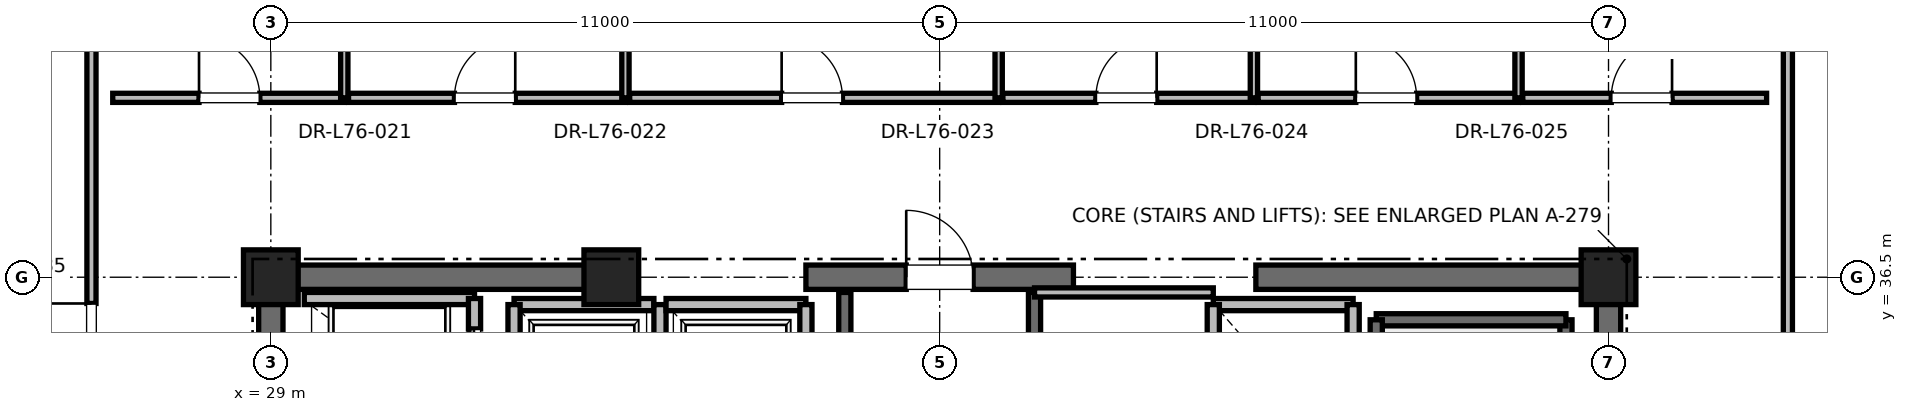
"""IFC4 building model, lengths in metres.
Left out: names, types, materials, properties, quantities, classifications, styles, units other than length and angle.
Written with IfcOpenShell. Run it as: python <this file> out.ifc"""

import sys

from ifc_helpers import new_model, si_unit, direction, frame, frame_2d, origin, origin_2d, place, context, subcontext, project, spatial, rectangle, extrude, element, fill, save


model = new_model("IFC4")
c1 = context("Model", 3, precision=1e-05, world=origin(), true_north=direction((0.0, 1.0)))
c2 = subcontext(c1, "Body", "Model", "MODEL_VIEW")
j1 = project(units=[si_unit("LENGTHUNIT", "METRE"), si_unit("PLANEANGLEUNIT", "RADIAN")], contexts=[c1])
p1 = place(None, origin())
s1 = spatial("IfcSite", under=j1, at=p1, CompositionType="ELEMENT")
p2 = place(p1, origin())
s2 = spatial("IfcBuilding", under=s1, at=p2, CompositionType="ELEMENT")
p3 = place(p2, frame((0.0, 0.0, 326.8)))
s3 = spatial("IfcBuildingStorey", under=s2, at=p3, CompositionType="ELEMENT", Elevation=326.8)
for number, where, z_axis, x_axis in (
    (1, (29.0, 36.5, 0.0), (0.0, 0.0, 1.0), (1.0, 0.0, 0.0)),
    (2, (51.0, 36.5, 0.0), (0.0, 0.0, 1.0), (1.0, 0.0, 0.0)),
    (3, (34.6, 36.5, 0.0), (0.0, 0.0, 1.0), (1.0, 0.0, 0.0)),
):
    element("IfcColumn", number, at=place(p3, frame(where, z_axis=z_axis, x_axis=x_axis)), inside=s3, PredefinedType="PILASTER", context=c2, shape_type="SweptSolid", body=[
        extrude(rectangle(XDim=0.9, YDim=0.9, at=origin_2d()), origin(), (0.0, 0.0, 1.0), 4.0),
    ])
p4 = place(p3, frame((29.0, 36.5, 0.0), z_axis=(0.0, 0.0, 1.0), x_axis=(1.0, 0.0, 0.0)))
e4 = element("IfcWall", 4, at=p4, inside=s3, PredefinedType="SHEAR", context=c2, shape_type="SweptSolid", body=[
    extrude(rectangle(XDim=5.8, YDim=0.4, at=frame_2d((2.9, 0.0))), origin(), (0.0, 0.0, 1.0), 3.785),
])
p5 = place(p3, frame((37.8, 36.5, 0.0), z_axis=(0.0, 0.0, 1.0), x_axis=(1.0, 0.0, 0.0)))
e5 = element("IfcWall", 5, at=p5, inside=s3, PredefinedType="SHEAR", context=c2, shape_type="SweptSolid", body=[
    extrude(rectangle(XDim=4.4, YDim=0.4, at=frame_2d((2.2, 0.0))), origin(), (0.0, 0.0, 1.0), 3.785),
])
p6 = place(p5, frame((1.65, 0.0, 0.0)))
e6 = element("IfcOpeningElement", 6, at=p6, cuts=e5, PredefinedType="OPENING", context=c2, shape_type="SweptSolid", body=[
    extrude(rectangle(XDim=1.1, YDim=2.15, at=frame_2d((0.55, 1.075))), frame((0.0, 0.2, 0.0), z_axis=(0.0, -1.0, 0.0), x_axis=(1.0, 0.0, 0.0)), (0.0, 0.0, 1.0), 0.4),
])
for number, where, z_axis, x_axis in (
    (7, (45.2, 36.5, 0.0), (0.0, 0.0, 1.0), (1.0, 0.0, 0.0)),
    (8, (29.0, 30.7, 0.0), (0.0, 0.0, 1.0), (0.0, 1.0, 0.0)),
):
    element("IfcWall", number, at=place(p3, frame(where, z_axis=z_axis, x_axis=x_axis)), inside=s3, PredefinedType="SHEAR", context=c2, shape_type="SweptSolid", body=[
        extrude(rectangle(XDim=5.8, YDim=0.4, at=frame_2d((2.9, 0.0))), origin(), (0.0, 0.0, 1.0), 3.785),
    ])
p7 = place(p3, frame((51.0, 27.7, 0.0), z_axis=(0.0, 0.0, 1.0), x_axis=(0.0, 1.0, 0.0)))
e9 = element("IfcWall", 9, at=p7, inside=s3, PredefinedType="SHEAR", context=c2, shape_type="SweptSolid", body=[
    extrude(rectangle(XDim=8.8, YDim=0.4, at=frame_2d((4.4, 0.0))), origin(), (0.0, 0.0, 1.0), 3.785),
])
p8 = place(p3, frame((50.3, 27.65, 0.0), z_axis=(0.0, 0.0, 1.0), x_axis=(0.0, 1.0, 0.0)))
e10 = element("IfcWall", 10, at=p8, inside=s3, PredefinedType="SOLIDWALL", context=c2, shape_type="SweptSolid", body=[
    extrude(rectangle(XDim=8.15, YDim=0.2, at=frame_2d((4.075, 0.0))), origin(), (0.0, 0.0, 1.0), 3.785),
])
p9 = place(p3, frame((47.18, 35.8, 0.0), z_axis=(0.0, 0.0, 1.0), x_axis=(1.0, 0.0, 0.0)))
e11 = element("IfcWall", 11, at=p9, inside=s3, PredefinedType="SOLIDWALL", context=c2, shape_type="SweptSolid", body=[
    extrude(rectangle(XDim=3.12, YDim=0.2, at=frame_2d((1.56, 0.0))), origin(), (0.0, 0.0, 1.0), 3.785),
])
p10 = place(p3, frame((47.18, 27.62, 0.0), z_axis=(0.0, 0.0, 1.0), x_axis=(0.0, 1.0, 0.0)))
e12 = element("IfcWall", 12, at=p10, inside=s3, PredefinedType="SOLIDWALL", context=c2, shape_type="SweptSolid", body=[
    extrude(rectangle(XDim=8.18, YDim=0.2, at=frame_2d((4.09, 0.0))), origin(), (0.0, 0.0, 1.0), 3.785),
])
p11 = place(p3, frame((38.44, 27.38, 0.0), z_axis=(0.0, 0.0, 1.0), x_axis=(0.0, 1.0, 0.0)))
e13 = element("IfcWall", 13, at=p11, inside=s3, PredefinedType="SOLIDWALL", context=c2, shape_type="SweptSolid", body=[
    extrude(rectangle(XDim=8.87, YDim=0.2, at=frame_2d((4.435, 0.0))), origin(), (0.0, 0.0, 1.0), 3.785),
])
p12 = place(p3, frame((41.56, 27.68, 0.0), z_axis=(0.0, 0.0, 1.0), x_axis=(0.0, 1.0, 0.0)))
e14 = element("IfcWall", 14, at=p12, inside=s3, PredefinedType="SOLIDWALL", context=c2, shape_type="SweptSolid", body=[
    extrude(rectangle(XDim=8.57, YDim=0.2, at=frame_2d((4.285, 0.0))), origin(), (0.0, 0.0, 1.0), 3.785),
])
p13 = place(p3, frame((32.35, 36.15, 0.0), z_axis=(0.0, 0.0, 1.0), x_axis=(-1.0, 0.0, 0.0)))
e15 = element("IfcWall", 15, at=p13, inside=s3, PredefinedType="SOLIDWALL", context=c2, shape_type="SweptSolid", body=[
    extrude(rectangle(XDim=2.8, YDim=0.2, at=frame_2d((1.4, 0.0))), origin(), (0.0, 0.0, 1.0), 3.22),
])
p14 = place(p3, frame((32.35, 34.05, 0.0), z_axis=(0.0, 0.0, 1.0), x_axis=(0.0, 1.0, 0.0)))
e16 = element("IfcWall", 16, at=p14, inside=s3, PredefinedType="SOLIDWALL", context=c2, shape_type="SweptSolid", body=[
    extrude(rectangle(XDim=2.1, YDim=0.2, at=frame_2d((1.05, 0.0))), origin(), (0.0, 0.0, 1.0), 3.785),
])
p15 = place(p14, frame((0.5, 0.0, 0.0)))
e17 = element("IfcOpeningElement", 17, at=p15, cuts=e16, PredefinedType="OPENING", context=c2, shape_type="SweptSolid", body=[
    extrude(rectangle(XDim=1.1, YDim=2.2, at=frame_2d((0.55, 1.1))), frame((0.0, 0.1, 0.0), z_axis=(0.0, -1.0, 0.0), x_axis=(1.0, 0.0, 0.0)), (0.0, 0.0, 1.0), 0.2),
])
p16 = place(p3, frame((35.3, 36.05, 0.0), z_axis=(0.0, 0.0, 1.0), x_axis=(-1.0, 0.0, 0.0)))
e18 = element("IfcWall", 18, at=p16, inside=s3, PredefinedType="SOLIDWALL", context=c2, shape_type="SweptSolid", body=[
    extrude(rectangle(XDim=2.3, YDim=0.2, at=frame_2d((1.15, 0.0))), origin(), (0.0, 0.0, 1.0), 2.865),
])
p17 = place(p3, frame((33.0, 36.05, 0.0), z_axis=(0.0, 0.0, 1.0), x_axis=(0.0, -1.0, 0.0)))
e19 = element("IfcWall", 19, at=p17, inside=s3, PredefinedType="SOLIDWALL", context=c2, shape_type="SweptSolid", body=[
    extrude(rectangle(XDim=2.6, YDim=0.2, at=frame_2d((1.3, 0.0))), origin(), (0.0, 0.0, 1.0), 3.785),
])
p18 = place(p3, frame((35.4, 33.45, 0.0), z_axis=(0.0, 0.0, 1.0), x_axis=(0.0, 1.0, 0.0)))
e20 = element("IfcWall", 20, at=p18, inside=s3, PredefinedType="SOLIDWALL", context=c2, shape_type="SweptSolid", body=[
    extrude(rectangle(XDim=2.6, YDim=0.2, at=frame_2d((1.3, 0.0))), origin(), (0.0, 0.0, 1.0), 2.865),
])
p19 = place(p3, frame((37.8, 36.05, 0.0), z_axis=(0.0, 0.0, 1.0), x_axis=(-1.0, 0.0, 0.0)))
e21 = element("IfcWall", 21, at=p19, inside=s3, PredefinedType="SOLIDWALL", context=c2, shape_type="SweptSolid", body=[
    extrude(rectangle(XDim=2.3, YDim=0.2, at=frame_2d((1.15, 0.0))), origin(), (0.0, 0.0, 1.0), 2.865),
])
p20 = place(p3, frame((37.8, 33.45, 0.0), z_axis=(0.0, 0.0, 1.0), x_axis=(0.0, 1.0, 0.0)))
e22 = element("IfcWall", 22, at=p20, inside=s3, PredefinedType="SOLIDWALL", context=c2, shape_type="SweptSolid", body=[
    extrude(rectangle(XDim=2.6, YDim=0.2, at=frame_2d((1.3, 0.0))), origin(), (0.0, 0.0, 1.0), 2.865),
])
p21 = place(p3, frame((46.8, 36.05, 0.0), z_axis=(0.0, 0.0, 1.0), x_axis=(-1.0, 0.0, 0.0)))
e23 = element("IfcWall", 23, at=p21, inside=s3, PredefinedType="SOLIDWALL", context=c2, shape_type="SweptSolid", body=[
    extrude(rectangle(XDim=2.3, YDim=0.2, at=frame_2d((1.15, 0.0))), origin(), (0.0, 0.0, 1.0), 2.865),
])
p22 = place(p3, frame((44.5, 36.05, 0.0), z_axis=(0.0, 0.0, 1.0), x_axis=(0.0, -1.0, 0.0)))
e24 = element("IfcWall", 24, at=p22, inside=s3, PredefinedType="SOLIDWALL", context=c2, shape_type="SweptSolid", body=[
    extrude(rectangle(XDim=2.6, YDim=0.2, at=frame_2d((1.3, 0.0))), origin(), (0.0, 0.0, 1.0), 2.865),
])
p23 = place(p3, frame((46.8, 33.45, 0.0), z_axis=(0.0, 0.0, 1.0), x_axis=(0.0, 1.0, 0.0)))
e25 = element("IfcWall", 25, at=p23, inside=s3, PredefinedType="SOLIDWALL", context=c2, shape_type="SweptSolid", body=[
    extrude(rectangle(XDim=2.6, YDim=0.2, at=frame_2d((1.3, 0.0))), origin(), (0.0, 0.0, 1.0), 3.785),
])
p24 = place(p3, frame((41.56, 36.25, 0.0), z_axis=(0.0, 0.0, 1.0), x_axis=(1.0, 0.0, 0.0)))
e26 = element("IfcWall", 26, at=p24, inside=s3, PredefinedType="PARTITIONING", context=c2, shape_type="SweptSolid", body=[
    extrude(rectangle(XDim=2.94, YDim=0.15, at=frame_2d((1.47, 0.0))), origin(), (0.0, 0.0, 1.0), 2.85),
])
p25 = place(p3, frame((26.4, 39.45, 0.0), z_axis=(0.0, 0.0, 1.0), x_axis=(1.0, 0.0, 0.0)))
e27 = element("IfcWall", 27, at=p25, inside=s3, PredefinedType="PARTITIONING", context=c2, shape_type="SweptSolid", body=[
    extrude(rectangle(XDim=3.808, YDim=0.15, at=frame_2d((1.904, 0.0))), origin(), (0.0, 0.0, 1.0), 2.85),
])
p26 = place(p25, frame((1.419, 0.0, 0.0)))
e28 = element("IfcOpeningElement", 28, at=p26, cuts=e27, PredefinedType="OPENING", context=c2, shape_type="SweptSolid", body=[
    extrude(rectangle(XDim=1.0, YDim=2.15, at=frame_2d((0.5, 1.075))), frame((0.0, 0.075, 0.0), z_axis=(0.0, -1.0, 0.0), x_axis=(1.0, 0.0, 0.0)), (0.0, 0.0, 1.0), 0.15),
])
p27 = place(p3, frame((30.208, 39.45, 0.0), z_axis=(0.0, 0.0, 1.0), x_axis=(0.0, 1.0, 0.0)))
e29 = element("IfcWall", 29, at=p27, inside=s3, PredefinedType="PARTITIONING", context=c2, shape_type="SweptSolid", body=[
    extrude(rectangle(XDim=9.566, YDim=0.12, at=frame_2d((4.783, 0.0))), origin(), (0.0, 0.0, 1.0), 2.415),
])
p28 = place(p3, frame((30.278, 39.45, 0.0), z_axis=(0.0, 0.0, 1.0), x_axis=(1.0, 0.0, 0.0)))
e30 = element("IfcWall", 30, at=p28, inside=s3, PredefinedType="PARTITIONING", context=c2, shape_type="SweptSolid", body=[
    extrude(rectangle(XDim=4.554, YDim=0.15, at=frame_2d((2.277, 0.0))), origin(), (0.0, 0.0, 1.0), 2.85),
])
p29 = place(p28, frame((1.742, 0.0, 0.0)))
e31 = element("IfcOpeningElement", 31, at=p29, cuts=e30, PredefinedType="OPENING", context=c2, shape_type="SweptSolid", body=[
    extrude(rectangle(XDim=1.0, YDim=2.15, at=frame_2d((0.5, 1.075))), frame((0.0, 0.075, 0.0), z_axis=(0.0, -1.0, 0.0), x_axis=(1.0, 0.0, 0.0)), (0.0, 0.0, 1.0), 0.15),
])
p30 = place(p3, frame((34.832, 39.45, 0.0), z_axis=(0.0, 0.0, 1.0), x_axis=(0.0, 1.0, 0.0)))
e32 = element("IfcWall", 32, at=p30, inside=s3, PredefinedType="PARTITIONING", context=c2, shape_type="SweptSolid", body=[
    extrude(rectangle(XDim=9.566, YDim=0.12, at=frame_2d((4.783, 0.0))), origin(), (0.0, 0.0, 1.0), 2.415),
])
p31 = place(p3, frame((34.902, 39.45, 0.0), z_axis=(0.0, 0.0, 1.0), x_axis=(1.0, 0.0, 0.0)))
e33 = element("IfcWall", 33, at=p31, inside=s3, PredefinedType="PARTITIONING", context=c2, shape_type="SweptSolid", body=[
    extrude(rectangle(XDim=6.068, YDim=0.15, at=frame_2d((3.034, 0.0))), origin(), (0.0, 0.0, 1.0), 2.85),
])
p32 = place(p31, frame((2.499, 0.0, 0.0)))
e34 = element("IfcOpeningElement", 34, at=p32, cuts=e33, PredefinedType="OPENING", context=c2, shape_type="SweptSolid", body=[
    extrude(rectangle(XDim=1.0, YDim=2.15, at=frame_2d((0.5, 1.075))), frame((0.0, 0.075, 0.0), z_axis=(0.0, -1.0, 0.0), x_axis=(1.0, 0.0, 0.0)), (0.0, 0.0, 1.0), 0.15),
])
p33 = place(p3, frame((40.97, 39.45, 0.0), z_axis=(0.0, 0.0, 1.0), x_axis=(0.0, 1.0, 0.0)))
e35 = element("IfcWall", 35, at=p33, inside=s3, PredefinedType="PARTITIONING", context=c2, shape_type="SweptSolid", body=[
    extrude(rectangle(XDim=9.566, YDim=0.12, at=frame_2d((4.783, 0.0))), origin(), (0.0, 0.0, 1.0), 2.415),
])
p34 = place(p3, frame((41.04, 39.45, 0.0), z_axis=(0.0, 0.0, 1.0), x_axis=(1.0, 0.0, 0.0)))
e36 = element("IfcWall", 36, at=p34, inside=s3, PredefinedType="PARTITIONING", context=c2, shape_type="SweptSolid", body=[
    extrude(rectangle(XDim=4.128, YDim=0.15, at=frame_2d((2.064, 0.0))), origin(), (0.0, 0.0, 1.0), 2.85),
])
p35 = place(p34, frame((1.529, 0.0, 0.0)))
e37 = element("IfcOpeningElement", 37, at=p35, cuts=e36, PredefinedType="OPENING", context=c2, shape_type="SweptSolid", body=[
    extrude(rectangle(XDim=1.0, YDim=2.15, at=frame_2d((0.5, 1.075))), frame((0.0, 0.075, 0.0), z_axis=(0.0, -1.0, 0.0), x_axis=(1.0, 0.0, 0.0)), (0.0, 0.0, 1.0), 0.15),
])
p36 = place(p3, frame((45.168, 39.45, 0.0), z_axis=(0.0, 0.0, 1.0), x_axis=(0.0, 1.0, 0.0)))
e38 = element("IfcWall", 38, at=p36, inside=s3, PredefinedType="PARTITIONING", context=c2, shape_type="SweptSolid", body=[
    extrude(rectangle(XDim=9.566, YDim=0.12, at=frame_2d((4.783, 0.0))), origin(), (0.0, 0.0, 1.0), 2.415),
])
p37 = place(p3, frame((45.238, 39.45, 0.0), z_axis=(0.0, 0.0, 1.0), x_axis=(1.0, 0.0, 0.0)))
e39 = element("IfcWall", 39, at=p37, inside=s3, PredefinedType="PARTITIONING", context=c2, shape_type="SweptSolid", body=[
    extrude(rectangle(XDim=4.282, YDim=0.15, at=frame_2d((2.141, 0.0))), origin(), (0.0, 0.0, 1.0), 2.85),
])
p38 = place(p37, frame((1.606, 0.0, 0.0)))
e40 = element("IfcOpeningElement", 40, at=p38, cuts=e39, PredefinedType="OPENING", context=c2, shape_type="SweptSolid", body=[
    extrude(rectangle(XDim=1.0, YDim=2.15, at=frame_2d((0.5, 1.075))), frame((0.0, 0.075, 0.0), z_axis=(0.0, -1.0, 0.0), x_axis=(1.0, 0.0, 0.0)), (0.0, 0.0, 1.0), 0.15),
])
p39 = place(p3, frame((49.52, 39.45, 0.0), z_axis=(0.0, 0.0, 1.0), x_axis=(0.0, 1.0, 0.0)))
e41 = element("IfcWall", 41, at=p39, inside=s3, PredefinedType="PARTITIONING", context=c2, shape_type="SweptSolid", body=[
    extrude(rectangle(XDim=9.566, YDim=0.12, at=frame_2d((4.783, 0.0))), origin(), (0.0, 0.0, 1.0), 2.415),
])
p40 = place(p3, frame((49.59, 39.45, 0.0), z_axis=(0.0, 0.0, 1.0), x_axis=(1.0, 0.0, 0.0)))
e42 = element("IfcWall", 42, at=p40, inside=s3, PredefinedType="PARTITIONING", context=c2, shape_type="SweptSolid", body=[
    extrude(rectangle(XDim=4.01, YDim=0.15, at=frame_2d((2.005, 0.0))), origin(), (0.0, 0.0, 1.0), 2.85),
])
p41 = place(p40, frame((1.455, 0.0, 0.0)))
e43 = element("IfcOpeningElement", 43, at=p41, cuts=e42, PredefinedType="OPENING", context=c2, shape_type="SweptSolid", body=[
    extrude(rectangle(XDim=1.0, YDim=2.15, at=frame_2d((0.5, 1.075))), frame((0.0, 0.075, 0.0), z_axis=(0.0, -1.0, 0.0), x_axis=(1.0, 0.0, 0.0)), (0.0, 0.0, 1.0), 0.15),
])
p42 = place(p3, frame((26.05, 34.736, 0.0), z_axis=(0.0, 0.0, 1.0), x_axis=(0.0, 1.0, 0.0)))
e44 = element("IfcWall", 44, at=p42, inside=s3, PredefinedType="PARTITIONING", context=c2, shape_type="SweptSolid", body=[
    extrude(rectangle(XDim=10.679, YDim=0.15, at=frame_2d((5.34, 0.0))), origin(), (0.0, 0.0, 1.0), 2.85),
])
p43 = place(p42, frame((0.332, 0.0, 0.0)))
e45 = element("IfcOpeningElement", 45, at=p43, cuts=e44, PredefinedType="OPENING", context=c2, shape_type="SweptSolid", body=[
    extrude(rectangle(XDim=1.0, YDim=2.15, at=frame_2d((0.5, 1.075))), frame((0.0, 0.075, 0.0), z_axis=(0.0, -1.0, 0.0), x_axis=(1.0, 0.0, 0.0)), (0.0, 0.0, 1.0), 0.15),
])
p44 = place(p3, frame((53.95, 24.704, 0.0), z_axis=(0.0, 0.0, 1.0), x_axis=(0.0, 1.0, 0.0)))
e46 = element("IfcWall", 46, at=p44, inside=s3, PredefinedType="PARTITIONING", context=c2, shape_type="SweptSolid", body=[
    extrude(rectangle(XDim=20.712, YDim=0.15, at=frame_2d((10.356, 0.0))), origin(), (0.0, 0.0, 1.0), 2.85),
])
p45 = place(p44, frame((5.348, 0.0, 0.0)))
e47 = element("IfcOpeningElement", 47, at=p45, cuts=e46, PredefinedType="OPENING", context=c2, shape_type="SweptSolid", body=[
    extrude(rectangle(XDim=1.0, YDim=2.15, at=frame_2d((0.5, 1.075))), frame((0.0, 0.075, 0.0), z_axis=(0.0, -1.0, 0.0), x_axis=(1.0, 0.0, 0.0)), (0.0, 0.0, 1.0), 0.15),
])
p46 = place(p6, origin())
e48 = element("IfcDoor", 48, at=p46, inside=s3, OperationType="SINGLE_SWING_LEFT", PredefinedType="DOOR", context=c2, shape_type="SweptSolid", body=[
    extrude(rectangle(XDim=1.1, YDim=2.15, at=frame_2d((0.55, 1.075))), frame((0.0, 0.025, 0.0), z_axis=(0.0, -1.0, 0.0), x_axis=(1.0, 0.0, 0.0)), (0.0, 0.0, 1.0), 0.05),
])
fill(e6, e48)
p47 = place(p15, origin())
e49 = element("IfcDoor", 49, at=p47, inside=s3, OperationType="SLIDING_TO_RIGHT", PredefinedType="DOOR", context=c2, shape_type="SweptSolid", body=[
    extrude(rectangle(XDim=1.1, YDim=2.2, at=frame_2d((0.55, 1.1))), frame((0.0, 0.025, 0.0), z_axis=(0.0, -1.0, 0.0), x_axis=(1.0, 0.0, 0.0)), (0.0, 0.0, 1.0), 0.05),
])
fill(e17, e49)
p48 = place(p26, origin())
e50 = element("IfcDoor", 50, at=p48, inside=s3, OperationType="SINGLE_SWING_LEFT", PredefinedType="DOOR", context=c2, shape_type="SweptSolid", body=[
    extrude(rectangle(XDim=1.0, YDim=2.15, at=frame_2d((0.5, 1.075))), frame((0.0, 0.025, 0.0), z_axis=(0.0, -1.0, 0.0), x_axis=(1.0, 0.0, 0.0)), (0.0, 0.0, 1.0), 0.05),
])
fill(e28, e50)
p49 = place(p29, origin())
e51 = element("IfcDoor", 51, at=p49, inside=s3, OperationType="SINGLE_SWING_RIGHT", PredefinedType="DOOR", context=c2, shape_type="SweptSolid", body=[
    extrude(rectangle(XDim=1.0, YDim=2.15, at=frame_2d((0.5, 1.075))), frame((0.0, 0.025, 0.0), z_axis=(0.0, -1.0, 0.0), x_axis=(1.0, 0.0, 0.0)), (0.0, 0.0, 1.0), 0.05),
])
fill(e31, e51)
p50 = place(p32, origin())
e52 = element("IfcDoor", 52, at=p50, inside=s3, OperationType="SINGLE_SWING_LEFT", PredefinedType="DOOR", context=c2, shape_type="SweptSolid", body=[
    extrude(rectangle(XDim=1.0, YDim=2.15, at=frame_2d((0.5, 1.075))), frame((0.0, 0.025, 0.0), z_axis=(0.0, -1.0, 0.0), x_axis=(1.0, 0.0, 0.0)), (0.0, 0.0, 1.0), 0.05),
])
fill(e34, e52)
p51 = place(p35, origin())
e53 = element("IfcDoor", 53, at=p51, inside=s3, OperationType="SINGLE_SWING_RIGHT", PredefinedType="DOOR", context=c2, shape_type="SweptSolid", body=[
    extrude(rectangle(XDim=1.0, YDim=2.15, at=frame_2d((0.5, 1.075))), frame((0.0, 0.025, 0.0), z_axis=(0.0, -1.0, 0.0), x_axis=(1.0, 0.0, 0.0)), (0.0, 0.0, 1.0), 0.05),
])
fill(e37, e53)
p52 = place(p38, origin())
e54 = element("IfcDoor", 54, at=p52, inside=s3, OperationType="SINGLE_SWING_LEFT", PredefinedType="DOOR", context=c2, shape_type="SweptSolid", body=[
    extrude(rectangle(XDim=1.0, YDim=2.15, at=frame_2d((0.5, 1.075))), frame((0.0, 0.025, 0.0), z_axis=(0.0, -1.0, 0.0), x_axis=(1.0, 0.0, 0.0)), (0.0, 0.0, 1.0), 0.05),
])
fill(e40, e54)
p53 = place(p41, origin())
e55 = element("IfcDoor", 55, at=p53, inside=s3, OperationType="SINGLE_SWING_RIGHT", PredefinedType="DOOR", context=c2, shape_type="SweptSolid", body=[
    extrude(rectangle(XDim=1.0, YDim=2.15, at=frame_2d((0.5, 1.075))), frame((0.0, 0.025, 0.0), z_axis=(0.0, -1.0, 0.0), x_axis=(1.0, 0.0, 0.0)), (0.0, 0.0, 1.0), 0.05),
])
fill(e43, e55)
p54 = place(p43, origin())
e56 = element("IfcDoor", 56, at=p54, inside=s3, OperationType="SINGLE_SWING_RIGHT", PredefinedType="DOOR", context=c2, shape_type="SweptSolid", body=[
    extrude(rectangle(XDim=1.0, YDim=2.15, at=frame_2d((0.5, 1.075))), frame((0.0, 0.025, 0.0), z_axis=(0.0, -1.0, 0.0), x_axis=(1.0, 0.0, 0.0)), (0.0, 0.0, 1.0), 0.05),
])
fill(e45, e56)
save(model, sys.argv[1])
